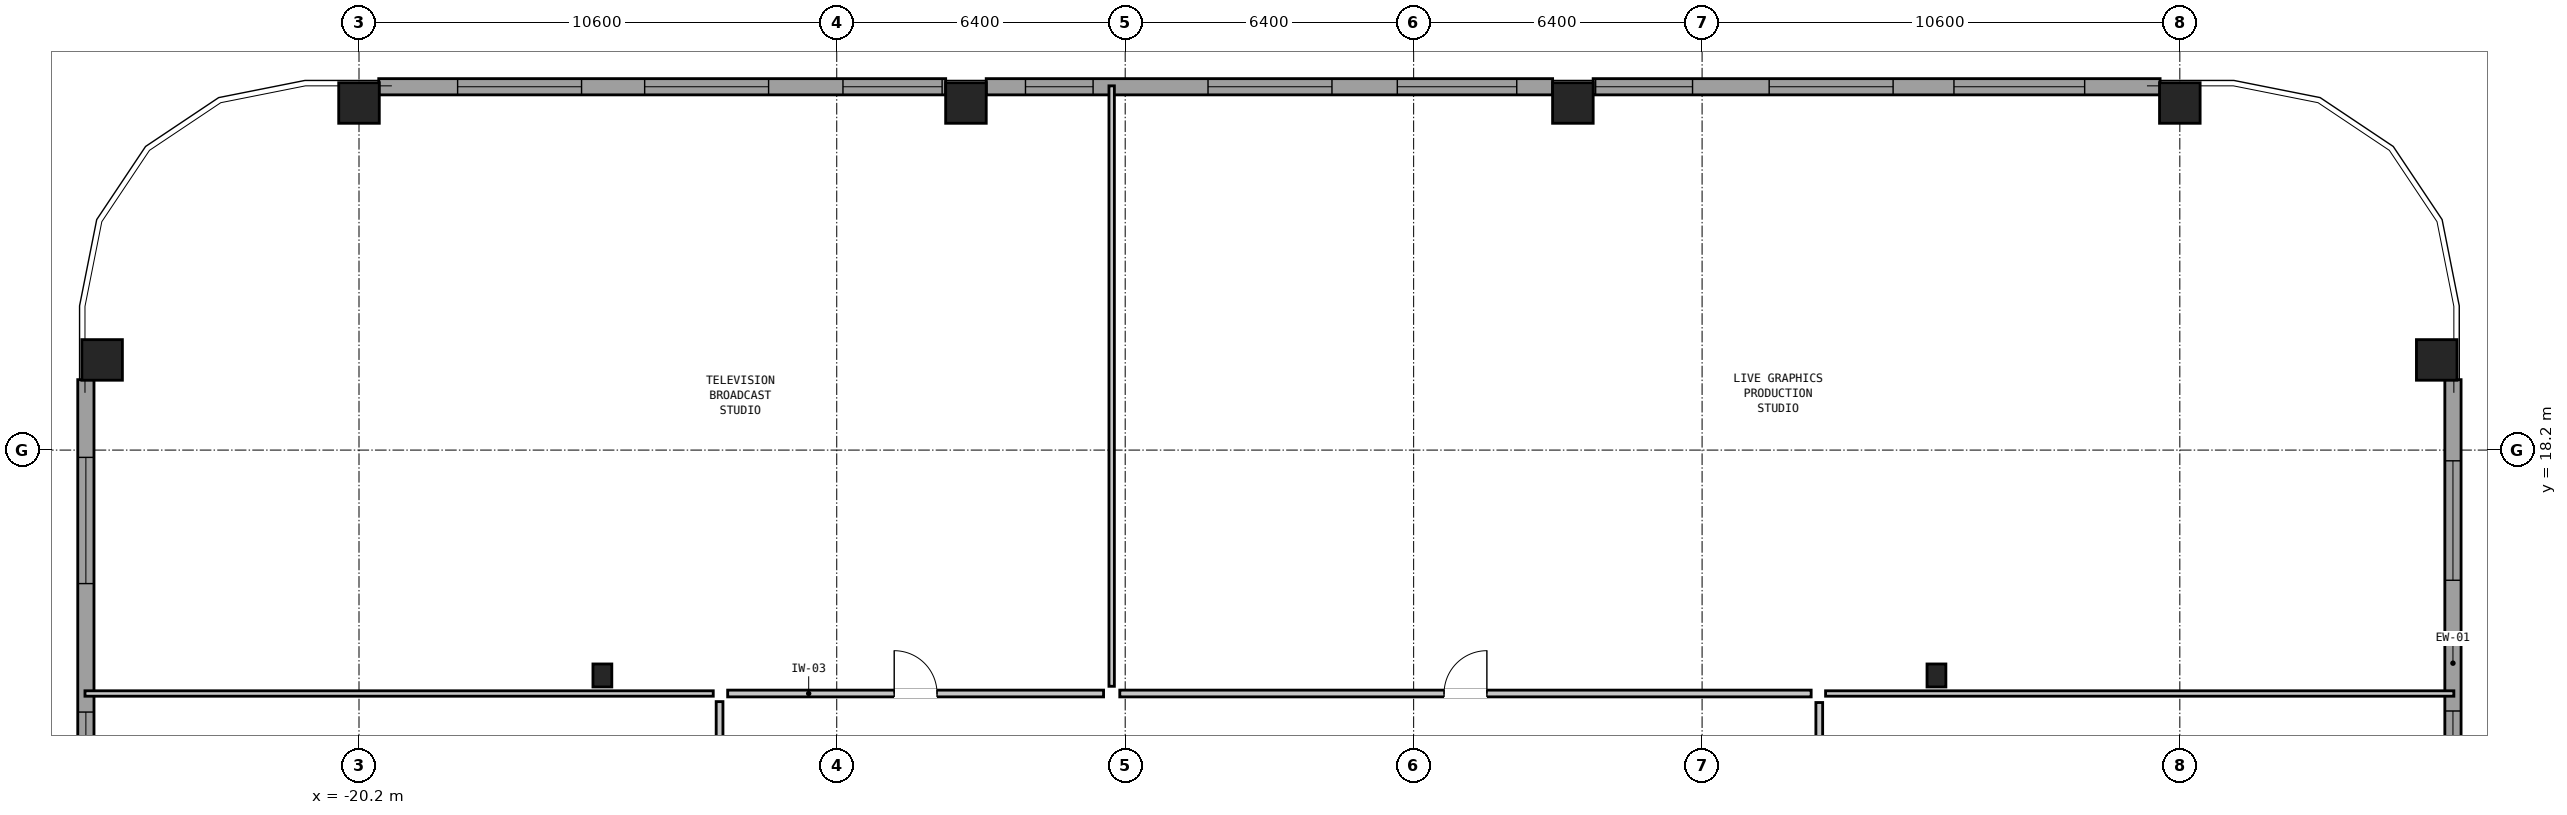
"""IFC4 building model, lengths in metres.
Left out: names, types, materials, properties, quantities, classifications, styles, units other than length and angle.
Written with IfcOpenShell. Run it as: python <this file> out.ifc"""

import sys

from ifc_helpers import new_model, si_unit, direction, frame, frame_2d, origin, origin_2d, place, context, subcontext, project, spatial, rectangle, hollow_rectangle, i_section, extrude, element, fill, save


model = new_model("IFC4")
c1 = context("Model", 3, precision=1e-05, world=origin(), true_north=direction((0.0, 1.0)))
c2 = subcontext(c1, "Body", "Model", "MODEL_VIEW")
j1 = project(units=[si_unit("LENGTHUNIT", "METRE"), si_unit("PLANEANGLEUNIT", "RADIAN")], contexts=[c1])
p1 = place(None, origin())
s1 = spatial("IfcSite", under=j1, at=p1, CompositionType="ELEMENT")
p2 = place(p1, origin())
s2 = spatial("IfcBuilding", under=s1, at=p2, CompositionType="ELEMENT")
p3 = place(p2, frame((0.0, 0.0, 29.15)))
s3 = spatial("IfcBuildingStorey", under=s2, at=p3, CompositionType="ELEMENT", Elevation=29.15)
for number, where, z_axis, x_axis in (
    (1, (25.9, 20.2, 0.0), (0.0, 0.0, 1.0), (0.0, 1.0, 0.0)),
    (2, (20.2, 25.9, 0.0), (0.0, 0.0, 1.0), (1.0, 0.0, 0.0)),
    (3, (6.733, 25.9, 0.0), (0.0, 0.0, 1.0), (1.0, 0.0, 0.0)),
    (4, (-6.733, 25.9, 0.0), (0.0, 0.0, 1.0), (1.0, 0.0, 0.0)),
    (5, (-20.2, 25.9, 0.0), (0.0, 0.0, 1.0), (1.0, 0.0, 0.0)),
    (6, (-25.9, 20.2, 0.0), (0.0, 0.0, 1.0), (0.0, 1.0, 0.0)),
):
    element("IfcColumn", number, at=place(p3, frame(where, z_axis=z_axis, x_axis=x_axis)), inside=s3, PredefinedType="COLUMN", context=c2, shape_type="SweptSolid", body=[
        extrude(hollow_rectangle(XDim=0.9, YDim=0.9, WallThickness=0.055, at=origin_2d()), origin(), (0.0, 0.0, 1.0), 3.05),
    ])
for number, where, z_axis, x_axis in (
    (7, (-14.8, 13.2, 0.0), (0.0, 0.0, 1.0), (1.0, 0.0, 0.0)),
    (8, (14.8, 13.2, 0.0), (0.0, 0.0, 1.0), (1.0, 0.0, 0.0)),
):
    element("IfcColumn", number, at=place(p3, frame(where, z_axis=z_axis, x_axis=x_axis)), inside=s3, PredefinedType="COLUMN", context=c2, shape_type="SweptSolid", body=[
        extrude(i_section(OverallWidth=0.418, OverallDepth=0.51, WebThickness=0.042, FlangeThickness=0.068, at=origin_2d()), origin(), (0.0, 0.0, 1.0), 3.05),
    ])
p4 = place(p3, frame((26.26, 19.762, 0.0), z_axis=(0.0, 0.0, 1.0), x_axis=(0.0, -1.0, 0.0)))
e9 = element("IfcWall", 9, at=p4, inside=s3, PredefinedType="SOLIDWALL", context=c2, shape_type="SweptSolid", body=[
    extrude(rectangle(XDim=12.579, YDim=0.36, at=frame_2d((6.289, 0.0))), origin(), (0.0, 0.0, 1.0), 2.067),
])
p5 = place(p4, frame((1.8, 0.0, 0.2)))
e10 = element("IfcOpeningElement", 10, at=p5, cuts=e9, PredefinedType="OPENING", context=c2, shape_type="SweptSolid", body=[
    extrude(rectangle(XDim=2.65, YDim=1.05, at=frame_2d((1.325, 0.525))), frame((0.0, 0.192, 0.0), z_axis=(0.0, -1.0, 0.0), x_axis=(1.0, 0.0, 0.0)), (0.0, 0.0, 1.0), 0.384),
])
p6 = place(p4, frame((7.35, 0.0, 0.9)))
e11 = element("IfcOpeningElement", 11, at=p6, cuts=e9, PredefinedType="OPENING", context=c2, shape_type="SweptSolid", body=[
    extrude(rectangle(XDim=1.35, YDim=1.0, at=frame_2d((0.675, 0.5))), frame((0.0, 0.192, 0.0), z_axis=(0.0, -1.0, 0.0), x_axis=(1.0, 0.0, 0.0)), (0.0, 0.0, 1.0), 0.384),
])
p7 = place(p4, frame((10.35, 0.0, 0.2)))
e12 = element("IfcOpeningElement", 12, at=p7, cuts=e9, PredefinedType="OPENING", context=c2, shape_type="SweptSolid", body=[
    extrude(rectangle(XDim=2.15, YDim=1.2, at=frame_2d((1.075, 0.6))), frame((0.0, 0.192, 0.0), z_axis=(0.0, -1.0, 0.0), x_axis=(1.0, 0.0, 0.0)), (0.0, 0.0, 1.0), 0.384),
])
p8 = place(p3, frame((-19.762, 26.26, 0.0), z_axis=(0.0, 0.0, 1.0), x_axis=(1.0, 0.0, 0.0)))
e13 = element("IfcWall", 13, at=p8, inside=s3, PredefinedType="SOLIDWALL", context=c2, shape_type="SweptSolid", body=[
    extrude(rectangle(XDim=12.579, YDim=0.36, at=frame_2d((6.289, 0.0))), origin(), (0.0, 0.0, 1.0), 2.067),
])
p9 = place(p8, frame((1.75, 0.0, 0.2)))
e14 = element("IfcOpeningElement", 14, at=p9, cuts=e13, PredefinedType="OPENING", context=c2, shape_type="SweptSolid", body=[
    extrude(rectangle(XDim=2.75, YDim=0.95, at=frame_2d((1.375, 0.475))), frame((0.0, 0.192, 0.0), z_axis=(0.0, -1.0, 0.0), x_axis=(1.0, 0.0, 0.0)), (0.0, 0.0, 1.0), 0.384),
])
p10 = place(p8, frame((5.9, 0.0, 0.95)))
e15 = element("IfcOpeningElement", 15, at=p10, cuts=e13, PredefinedType="OPENING", context=c2, shape_type="SweptSolid", body=[
    extrude(rectangle(XDim=2.75, YDim=0.95, at=frame_2d((1.375, 0.475))), frame((0.0, 0.192, 0.0), z_axis=(0.0, -1.0, 0.0), x_axis=(1.0, 0.0, 0.0)), (0.0, 0.0, 1.0), 0.384),
])
p11 = place(p8, frame((10.3, 0.0, 0.2)))
e16 = element("IfcOpeningElement", 16, at=p11, cuts=e13, PredefinedType="OPENING", context=c2, shape_type="SweptSolid", body=[
    extrude(rectangle(XDim=2.2, YDim=1.1, at=frame_2d((1.1, 0.55))), frame((0.0, 0.192, 0.0), z_axis=(0.0, -1.0, 0.0), x_axis=(1.0, 0.0, 0.0)), (0.0, 0.0, 1.0), 0.384),
])
p12 = place(p3, frame((-6.283, 26.26, 0.0), z_axis=(0.0, 0.0, 1.0), x_axis=(1.0, 0.0, 0.0)))
e17 = element("IfcWall", 17, at=p12, inside=s3, PredefinedType="SOLIDWALL", context=c2, shape_type="SweptSolid", body=[
    extrude(rectangle(XDim=12.566, YDim=0.36, at=frame_2d((6.283, 0.0))), origin(), (0.0, 0.0, 1.0), 2.067),
])
p13 = place(p12, frame((0.871, 0.0, 0.85)))
e18 = element("IfcOpeningElement", 18, at=p13, cuts=e17, PredefinedType="OPENING", context=c2, shape_type="SweptSolid", body=[
    extrude(rectangle(XDim=1.5, YDim=1.05, at=frame_2d((0.75, 0.525))), frame((0.0, 0.192, 0.0), z_axis=(0.0, -1.0, 0.0), x_axis=(1.0, 0.0, 0.0)), (0.0, 0.0, 1.0), 0.384),
])
p14 = place(p12, frame((4.921, 0.0, 0.2)))
e19 = element("IfcOpeningElement", 19, at=p14, cuts=e17, PredefinedType="OPENING", context=c2, shape_type="SweptSolid", body=[
    extrude(rectangle(XDim=2.75, YDim=0.95, at=frame_2d((1.375, 0.475))), frame((0.0, 0.192, 0.0), z_axis=(0.0, -1.0, 0.0), x_axis=(1.0, 0.0, 0.0)), (0.0, 0.0, 1.0), 0.384),
])
p15 = place(p12, frame((9.121, 0.0, 0.9)))
e20 = element("IfcOpeningElement", 20, at=p15, cuts=e17, PredefinedType="OPENING", context=c2, shape_type="SweptSolid", body=[
    extrude(rectangle(XDim=2.65, YDim=1.0, at=frame_2d((1.325, 0.5))), frame((0.0, 0.192, 0.0), z_axis=(0.0, -1.0, 0.0), x_axis=(1.0, 0.0, 0.0)), (0.0, 0.0, 1.0), 0.384),
])
p16 = place(p3, frame((7.183, 26.26, 0.0), z_axis=(0.0, 0.0, 1.0), x_axis=(1.0, 0.0, 0.0)))
e21 = element("IfcWall", 21, at=p16, inside=s3, PredefinedType="SOLIDWALL", context=c2, shape_type="SweptSolid", body=[
    extrude(rectangle(XDim=12.579, YDim=0.36, at=frame_2d((6.289, 0.0))), origin(), (0.0, 0.0, 1.0), 2.067),
])
p17 = place(p16, frame((0.055, 0.0, 0.2)))
e22 = element("IfcOpeningElement", 22, at=p17, cuts=e21, PredefinedType="OPENING", context=c2, shape_type="SweptSolid", body=[
    extrude(rectangle(XDim=2.15, YDim=1.15, at=frame_2d((1.075, 0.575))), frame((0.0, 0.192, 0.0), z_axis=(0.0, -1.0, 0.0), x_axis=(1.0, 0.0, 0.0)), (0.0, 0.0, 1.0), 0.384),
])
p18 = place(p16, frame((3.905, 0.0, 0.95)))
e23 = element("IfcOpeningElement", 23, at=p18, cuts=e21, PredefinedType="OPENING", context=c2, shape_type="SweptSolid", body=[
    extrude(rectangle(XDim=2.75, YDim=0.95, at=frame_2d((1.375, 0.475))), frame((0.0, 0.192, 0.0), z_axis=(0.0, -1.0, 0.0), x_axis=(1.0, 0.0, 0.0)), (0.0, 0.0, 1.0), 0.384),
])
p19 = place(p16, frame((8.005, 0.0, 0.2)))
e24 = element("IfcOpeningElement", 24, at=p19, cuts=e21, PredefinedType="OPENING", context=c2, shape_type="SweptSolid", body=[
    extrude(rectangle(XDim=2.9, YDim=0.9, at=frame_2d((1.45, 0.45))), frame((0.0, 0.192, 0.0), z_axis=(0.0, -1.0, 0.0), x_axis=(1.0, 0.0, 0.0)), (0.0, 0.0, 1.0), 0.384),
])
p20 = place(p3, frame((-26.26, 7.183, 0.0), z_axis=(0.0, 0.0, 1.0), x_axis=(0.0, 1.0, 0.0)))
e25 = element("IfcWall", 25, at=p20, inside=s3, PredefinedType="SOLIDWALL", context=c2, shape_type="SweptSolid", body=[
    extrude(rectangle(XDim=12.579, YDim=0.36, at=frame_2d((6.289, 0.0))), origin(), (0.0, 0.0, 1.0), 2.067),
])
p21 = place(p20, frame((0.055, 0.0, 0.2)))
e26 = element("IfcOpeningElement", 26, at=p21, cuts=e25, PredefinedType="OPENING", context=c2, shape_type="SweptSolid", body=[
    extrude(rectangle(XDim=2.25, YDim=1.15, at=frame_2d((1.125, 0.575))), frame((0.0, 0.192, 0.0), z_axis=(0.0, -1.0, 0.0), x_axis=(1.0, 0.0, 0.0)), (0.0, 0.0, 1.0), 0.384),
])
p22 = place(p20, frame((3.805, 0.0, 0.95)))
e27 = element("IfcOpeningElement", 27, at=p22, cuts=e25, PredefinedType="OPENING", context=c2, shape_type="SweptSolid", body=[
    extrude(rectangle(XDim=1.4, YDim=0.95, at=frame_2d((0.7, 0.475))), frame((0.0, 0.192, 0.0), z_axis=(0.0, -1.0, 0.0), x_axis=(1.0, 0.0, 0.0)), (0.0, 0.0, 1.0), 0.384),
])
p23 = place(p20, frame((8.055, 0.0, 0.2)))
e28 = element("IfcOpeningElement", 28, at=p23, cuts=e25, PredefinedType="OPENING", context=c2, shape_type="SweptSolid", body=[
    extrude(rectangle(XDim=2.8, YDim=1.0, at=frame_2d((1.4, 0.5))), frame((0.0, 0.192, 0.0), z_axis=(0.0, -1.0, 0.0), x_axis=(1.0, 0.0, 0.0)), (0.0, 0.0, 1.0), 0.384),
])
for number, where, z_axis, x_axis in (
    (29, (-26.28, 12.8, 0.0), (0.0, 0.0, 1.0), (1.0, 0.0, 0.0)),
    (30, (12.34, 12.8, 0.0), (0.0, 0.0, 1.0), (1.0, 0.0, 0.0)),
):
    element("IfcWall", number, at=place(p3, frame(where, z_axis=z_axis, x_axis=x_axis)), inside=s3, PredefinedType="PARTITIONING", context=c2, shape_type="SweptSolid", body=[
        extrude(rectangle(XDim=13.94, YDim=0.12, at=frame_2d((6.97, 0.0))), origin(), (0.0, 0.0, 1.0), 2.83),
    ])
p24 = place(p3, frame((-3.5, 12.96, 0.0), z_axis=(0.0, 0.0, 1.0), x_axis=(0.0, 1.0, 0.0)))
e31 = element("IfcWall", 31, at=p24, inside=s3, PredefinedType="PARTITIONING", context=c2, shape_type="SweptSolid", body=[
    extrude(rectangle(XDim=13.32, YDim=0.12, at=frame_2d((6.66, 0.0))), origin(), (0.0, 0.0, 1.0), 2.274),
])
p25 = place(p3, frame((-12.02, 12.8, 0.0), z_axis=(0.0, 0.0, 1.0), x_axis=(1.0, 0.0, 0.0)))
e32 = element("IfcWall", 32, at=p25, inside=s3, PredefinedType="PARTITIONING", context=c2, shape_type="SweptSolid", body=[
    extrude(rectangle(XDim=8.34, YDim=0.15, at=frame_2d((4.17, 0.0))), origin(), (0.0, 0.0, 1.0), 2.83),
])
p26 = place(p25, frame((3.695, 0.0, 0.0)))
e33 = element("IfcOpeningElement", 33, at=p26, cuts=e32, PredefinedType="OPENING", context=c2, shape_type="SweptSolid", body=[
    extrude(rectangle(XDim=0.95, YDim=2.1, at=frame_2d((0.475, 1.05))), frame((0.0, 0.087, 0.0), z_axis=(0.0, -1.0, 0.0), x_axis=(1.0, 0.0, 0.0)), (0.0, 0.0, 1.0), 0.174),
])
p27 = place(p3, frame((-3.32, 12.8, 0.0), z_axis=(0.0, 0.0, 1.0), x_axis=(1.0, 0.0, 0.0)))
e34 = element("IfcWall", 34, at=p27, inside=s3, PredefinedType="PARTITIONING", context=c2, shape_type="SweptSolid", body=[
    extrude(rectangle(XDim=15.34, YDim=0.15, at=frame_2d((7.67, 0.0))), origin(), (0.0, 0.0, 1.0), 2.83),
])
p28 = place(p27, frame((7.195, 0.0, 0.0)))
e35 = element("IfcOpeningElement", 35, at=p28, cuts=e34, PredefinedType="OPENING", context=c2, shape_type="SweptSolid", body=[
    extrude(rectangle(XDim=0.95, YDim=2.1, at=frame_2d((0.475, 1.05))), frame((0.0, 0.087, 0.0), z_axis=(0.0, -1.0, 0.0), x_axis=(1.0, 0.0, 0.0)), (0.0, 0.0, 1.0), 0.174),
])
p29 = place(p3, frame((-12.2, -11.42, 0.0), z_axis=(0.0, 0.0, 1.0), x_axis=(0.0, 1.0, 0.0)))
e36 = element("IfcWall", 36, at=p29, inside=s3, PredefinedType="PARTITIONING", context=c2, shape_type="SweptSolid", body=[
    extrude(rectangle(XDim=24.04, YDim=0.15, at=frame_2d((12.02, 0.0))), origin(), (0.0, 0.0, 1.0), 2.83),
])
p30 = place(p29, frame((11.545, 0.0, 0.0)))
e37 = element("IfcOpeningElement", 37, at=p30, cuts=e36, PredefinedType="OPENING", context=c2, shape_type="SweptSolid", body=[
    extrude(rectangle(XDim=0.95, YDim=2.1, at=frame_2d((0.475, 1.05))), frame((0.0, 0.087, 0.0), z_axis=(0.0, -1.0, 0.0), x_axis=(1.0, 0.0, 0.0)), (0.0, 0.0, 1.0), 0.174),
])
p31 = place(p3, frame((12.2, 3.8, 0.0), z_axis=(0.0, 0.0, 1.0), x_axis=(0.0, 1.0, 0.0)))
e38 = element("IfcWall", 38, at=p31, inside=s3, PredefinedType="PARTITIONING", context=c2, shape_type="SweptSolid", body=[
    extrude(rectangle(XDim=8.8, YDim=0.15, at=frame_2d((4.4, 0.0))), origin(), (0.0, 0.0, 1.0), 2.83),
])
p32 = place(p31, frame((3.925, 0.0, 0.0)))
e39 = element("IfcOpeningElement", 39, at=p32, cuts=e38, PredefinedType="OPENING", context=c2, shape_type="SweptSolid", body=[
    extrude(rectangle(XDim=0.95, YDim=2.1, at=frame_2d((0.475, 1.05))), frame((0.0, 0.087, 0.0), z_axis=(0.0, -1.0, 0.0), x_axis=(1.0, 0.0, 0.0)), (0.0, 0.0, 1.0), 0.174),
])
p33 = place(p5, origin())
e40 = element("IfcWindow", 40, at=p33, inside=s3, PartitioningType="SINGLE_PANEL", PredefinedType="WINDOW", context=c2, shape_type="SweptSolid", body=[
    extrude(rectangle(XDim=2.65, YDim=1.05, at=frame_2d((1.325, 0.525))), frame((0.0, 0.03, 0.0), z_axis=(0.0, -1.0, 0.0), x_axis=(1.0, 0.0, 0.0)), (0.0, 0.0, 1.0), 0.06),
])
fill(e10, e40)
p34 = place(p6, origin())
e41 = element("IfcWindow", 41, at=p34, inside=s3, PartitioningType="SINGLE_PANEL", PredefinedType="WINDOW", context=c2, shape_type="SweptSolid", body=[
    extrude(rectangle(XDim=1.35, YDim=1.0, at=frame_2d((0.675, 0.5))), frame((0.0, 0.03, 0.0), z_axis=(0.0, -1.0, 0.0), x_axis=(1.0, 0.0, 0.0)), (0.0, 0.0, 1.0), 0.06),
])
fill(e11, e41)
p35 = place(p9, origin())
e42 = element("IfcWindow", 42, at=p35, inside=s3, PartitioningType="SINGLE_PANEL", PredefinedType="WINDOW", context=c2, shape_type="SweptSolid", body=[
    extrude(rectangle(XDim=2.75, YDim=0.95, at=frame_2d((1.375, 0.475))), frame((0.0, 0.03, 0.0), z_axis=(0.0, -1.0, 0.0), x_axis=(1.0, 0.0, 0.0)), (0.0, 0.0, 1.0), 0.06),
])
fill(e14, e42)
p36 = place(p10, origin())
e43 = element("IfcWindow", 43, at=p36, inside=s3, PartitioningType="SINGLE_PANEL", PredefinedType="WINDOW", context=c2, shape_type="SweptSolid", body=[
    extrude(rectangle(XDim=2.75, YDim=0.95, at=frame_2d((1.375, 0.475))), frame((0.0, 0.03, 0.0), z_axis=(0.0, -1.0, 0.0), x_axis=(1.0, 0.0, 0.0)), (0.0, 0.0, 1.0), 0.06),
])
fill(e15, e43)
p37 = place(p11, origin())
e44 = element("IfcWindow", 44, at=p37, inside=s3, PartitioningType="SINGLE_PANEL", PredefinedType="WINDOW", context=c2, shape_type="SweptSolid", body=[
    extrude(rectangle(XDim=2.2, YDim=1.1, at=frame_2d((1.1, 0.55))), frame((0.0, 0.03, 0.0), z_axis=(0.0, -1.0, 0.0), x_axis=(1.0, 0.0, 0.0)), (0.0, 0.0, 1.0), 0.06),
])
fill(e16, e44)
p38 = place(p13, origin())
e45 = element("IfcWindow", 45, at=p38, inside=s3, PartitioningType="SINGLE_PANEL", PredefinedType="WINDOW", context=c2, shape_type="SweptSolid", body=[
    extrude(rectangle(XDim=1.5, YDim=1.05, at=frame_2d((0.75, 0.525))), frame((0.0, 0.03, 0.0), z_axis=(0.0, -1.0, 0.0), x_axis=(1.0, 0.0, 0.0)), (0.0, 0.0, 1.0), 0.06),
])
fill(e18, e45)
p39 = place(p14, origin())
e46 = element("IfcWindow", 46, at=p39, inside=s3, PartitioningType="SINGLE_PANEL", PredefinedType="WINDOW", context=c2, shape_type="SweptSolid", body=[
    extrude(rectangle(XDim=2.75, YDim=0.95, at=frame_2d((1.375, 0.475))), frame((0.0, 0.03, 0.0), z_axis=(0.0, -1.0, 0.0), x_axis=(1.0, 0.0, 0.0)), (0.0, 0.0, 1.0), 0.06),
])
fill(e19, e46)
p40 = place(p15, origin())
e47 = element("IfcWindow", 47, at=p40, inside=s3, PartitioningType="SINGLE_PANEL", PredefinedType="WINDOW", context=c2, shape_type="SweptSolid", body=[
    extrude(rectangle(XDim=2.65, YDim=1.0, at=frame_2d((1.325, 0.5))), frame((0.0, 0.03, 0.0), z_axis=(0.0, -1.0, 0.0), x_axis=(1.0, 0.0, 0.0)), (0.0, 0.0, 1.0), 0.06),
])
fill(e20, e47)
p41 = place(p17, origin())
e48 = element("IfcWindow", 48, at=p41, inside=s3, PartitioningType="SINGLE_PANEL", PredefinedType="WINDOW", context=c2, shape_type="SweptSolid", body=[
    extrude(rectangle(XDim=2.15, YDim=1.15, at=frame_2d((1.075, 0.575))), frame((0.0, 0.03, 0.0), z_axis=(0.0, -1.0, 0.0), x_axis=(1.0, 0.0, 0.0)), (0.0, 0.0, 1.0), 0.06),
])
fill(e22, e48)
p42 = place(p18, origin())
e49 = element("IfcWindow", 49, at=p42, inside=s3, PartitioningType="SINGLE_PANEL", PredefinedType="WINDOW", context=c2, shape_type="SweptSolid", body=[
    extrude(rectangle(XDim=2.75, YDim=0.95, at=frame_2d((1.375, 0.475))), frame((0.0, 0.03, 0.0), z_axis=(0.0, -1.0, 0.0), x_axis=(1.0, 0.0, 0.0)), (0.0, 0.0, 1.0), 0.06),
])
fill(e23, e49)
p43 = place(p19, origin())
e50 = element("IfcWindow", 50, at=p43, inside=s3, PartitioningType="SINGLE_PANEL", PredefinedType="WINDOW", context=c2, shape_type="SweptSolid", body=[
    extrude(rectangle(XDim=2.9, YDim=0.9, at=frame_2d((1.45, 0.45))), frame((0.0, 0.03, 0.0), z_axis=(0.0, -1.0, 0.0), x_axis=(1.0, 0.0, 0.0)), (0.0, 0.0, 1.0), 0.06),
])
fill(e24, e50)
p44 = place(p22, origin())
e51 = element("IfcWindow", 51, at=p44, inside=s3, PartitioningType="SINGLE_PANEL", PredefinedType="WINDOW", context=c2, shape_type="SweptSolid", body=[
    extrude(rectangle(XDim=1.4, YDim=0.95, at=frame_2d((0.7, 0.475))), frame((0.0, 0.03, 0.0), z_axis=(0.0, -1.0, 0.0), x_axis=(1.0, 0.0, 0.0)), (0.0, 0.0, 1.0), 0.06),
])
fill(e27, e51)
p45 = place(p23, origin())
e52 = element("IfcWindow", 52, at=p45, inside=s3, PartitioningType="SINGLE_PANEL", PredefinedType="WINDOW", context=c2, shape_type="SweptSolid", body=[
    extrude(rectangle(XDim=2.8, YDim=1.0, at=frame_2d((1.4, 0.5))), frame((0.0, 0.03, 0.0), z_axis=(0.0, -1.0, 0.0), x_axis=(1.0, 0.0, 0.0)), (0.0, 0.0, 1.0), 0.06),
])
fill(e28, e52)
p46 = place(p26, origin())
e53 = element("IfcDoor", 53, at=p46, inside=s3, OperationType="SINGLE_SWING_LEFT", PredefinedType="DOOR", context=c2, shape_type="SweptSolid", body=[
    extrude(rectangle(XDim=0.95, YDim=2.1, at=frame_2d((0.475, 1.05))), frame((0.0, 0.025, 0.0), z_axis=(0.0, -1.0, 0.0), x_axis=(1.0, 0.0, 0.0)), (0.0, 0.0, 1.0), 0.05),
])
fill(e33, e53)
p47 = place(p28, origin())
e54 = element("IfcDoor", 54, at=p47, inside=s3, OperationType="SINGLE_SWING_RIGHT", PredefinedType="DOOR", context=c2, shape_type="SweptSolid", body=[
    extrude(rectangle(XDim=0.95, YDim=2.1, at=frame_2d((0.475, 1.05))), frame((0.0, 0.025, 0.0), z_axis=(0.0, -1.0, 0.0), x_axis=(1.0, 0.0, 0.0)), (0.0, 0.0, 1.0), 0.05),
])
fill(e35, e54)
save(model, sys.argv[1])
